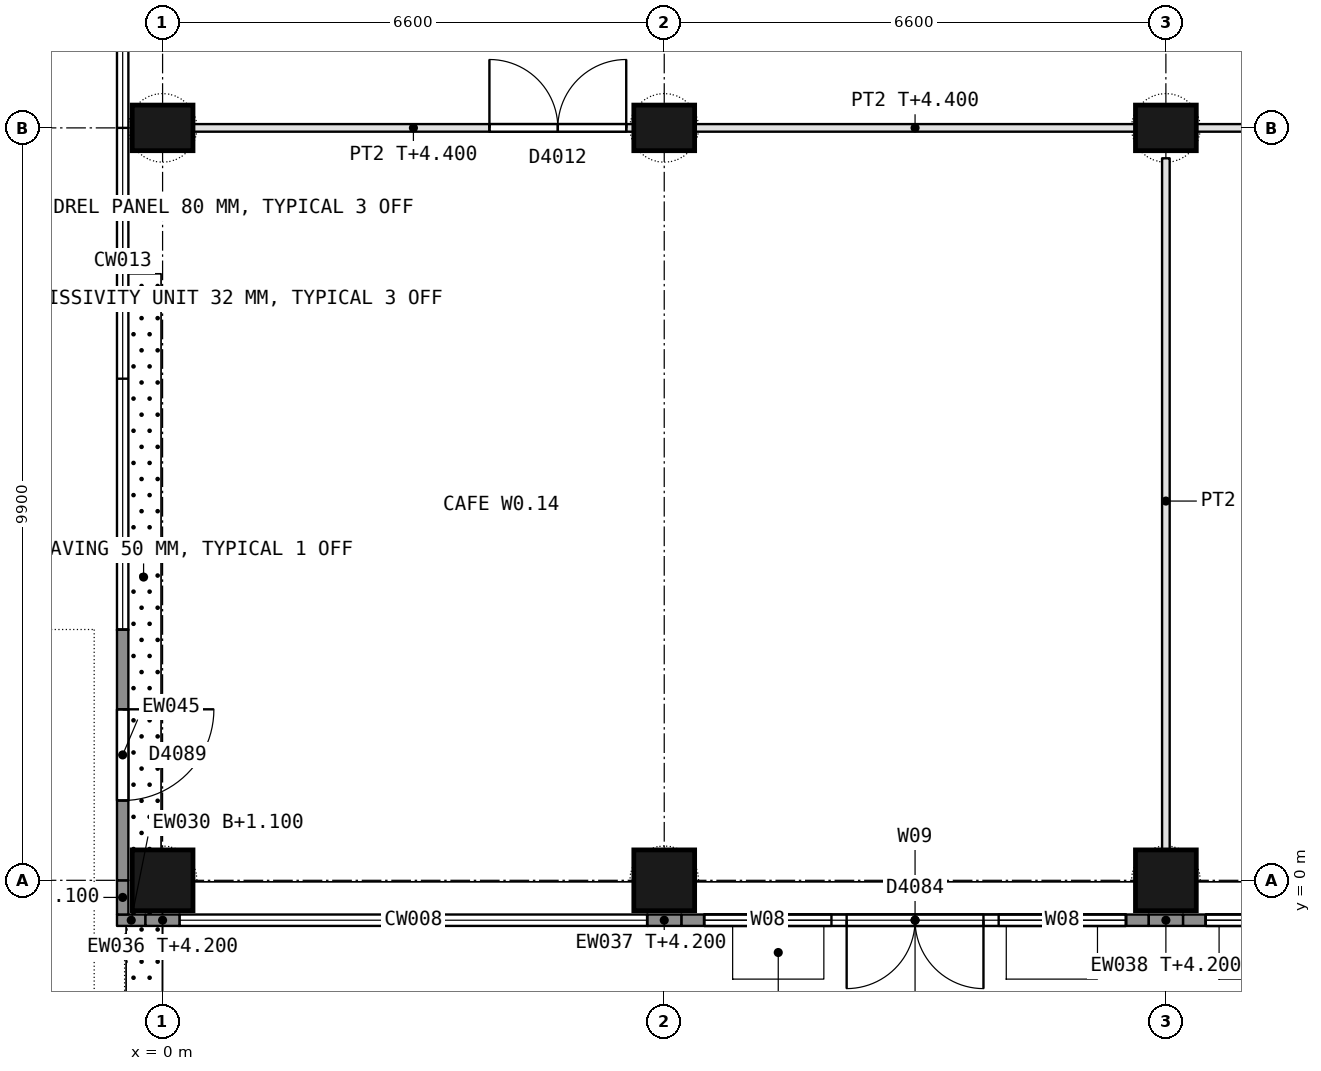
"""IFC4 building model, lengths in metres.
Left out: names, types, materials, properties, quantities, classifications, styles, units other than length and angle.
Written with IfcOpenShell. Run it as: python <this file> out.ifc"""

import sys

from ifc_helpers import new_model, si_unit, direction, frame, frame_2d, origin, origin_with_axes, origin_2d, place, context, subcontext, project, spatial, rectangle, extrude, element, fill, save


model = new_model("IFC4")
c1 = context("Model", 3, precision=1e-05, world=origin(), true_north=direction((0.0, 1.0)))
c2 = subcontext(c1, "Body", "Model", "MODEL_VIEW")
j1 = project(units=[si_unit("LENGTHUNIT", "METRE"), si_unit("PLANEANGLEUNIT", "RADIAN")], contexts=[c1])
p1 = place(None, origin())
s1 = spatial("IfcSite", under=j1, at=p1, CompositionType="ELEMENT")
p2 = place(p1, origin())
s2 = spatial("IfcBuilding", under=s1, at=p2, CompositionType="ELEMENT")
p3 = place(p2, origin())
s3 = spatial("IfcBuildingStorey", under=s2, at=p3, CompositionType="ELEMENT", Elevation=0.0)
p4 = place(p3, origin_with_axes())
e1 = element("IfcColumn", 1, at=p4, inside=s3, PredefinedType="COLUMN", context=c2, shape_type="SweptSolid", body=[
    extrude(rectangle(XDim=0.8, YDim=0.8, at=origin_2d()), origin(), (0.0, 0.0, 1.0), 5.4),
])
p5 = place(p3, frame((0.0, 9.9, 0.0), z_axis=(0.0, 0.0, 1.0), x_axis=(1.0, 0.0, 0.0)))
e2 = element("IfcColumn", 2, at=p5, inside=s3, PredefinedType="COLUMN", context=c2, shape_type="SweptSolid", body=[
    extrude(rectangle(XDim=0.8, YDim=0.6, at=origin_2d()), origin(), (0.0, 0.0, 1.0), 5.4),
])
p6 = place(p3, frame((6.6, 0.0, 0.0), z_axis=(0.0, 0.0, 1.0), x_axis=(1.0, 0.0, 0.0)))
e3 = element("IfcColumn", 3, at=p6, inside=s3, PredefinedType="COLUMN", context=c2, shape_type="SweptSolid", body=[
    extrude(rectangle(XDim=0.8, YDim=0.8, at=origin_2d()), origin(), (0.0, 0.0, 1.0), 5.4),
])
p7 = place(p3, frame((6.6, 9.9, 0.0), z_axis=(0.0, 0.0, 1.0), x_axis=(1.0, 0.0, 0.0)))
e4 = element("IfcColumn", 4, at=p7, inside=s3, PredefinedType="COLUMN", context=c2, shape_type="SweptSolid", body=[
    extrude(rectangle(XDim=0.8, YDim=0.6, at=origin_2d()), origin(), (0.0, 0.0, 1.0), 5.4),
])
p8 = place(p3, frame((13.2, 0.0, 0.0), z_axis=(0.0, 0.0, 1.0), x_axis=(1.0, 0.0, 0.0)))
e5 = element("IfcColumn", 5, at=p8, inside=s3, PredefinedType="COLUMN", context=c2, shape_type="SweptSolid", body=[
    extrude(rectangle(XDim=0.8, YDim=0.8, at=origin_2d()), origin(), (0.0, 0.0, 1.0), 5.4),
])
p9 = place(p3, frame((13.2, 9.9, 0.0), z_axis=(0.0, 0.0, 1.0), x_axis=(1.0, 0.0, 0.0)))
e6 = element("IfcColumn", 6, at=p9, inside=s3, PredefinedType="COLUMN", context=c2, shape_type="SweptSolid", body=[
    extrude(rectangle(XDim=0.8, YDim=0.6, at=origin_2d()), origin(), (0.0, 0.0, 1.0), 5.4),
])
p10 = place(p3, frame((-0.225, -0.525, 1.1), z_axis=(0.0, 0.0, 1.0), x_axis=(-1.0, 0.0, 0.0)))
e7 = element("IfcWall", 7, at=p10, inside=s3, PredefinedType="STANDARD", context=c2, shape_type="SweptSolid", body=[
    extrude(rectangle(XDim=0.375, YDim=0.15, at=frame_2d((0.188, 0.0))), origin(), (0.0, 0.0, 1.0), 4.0),
])
p11 = place(p3, frame((12.975, -0.525, 0.0), z_axis=(0.0, 0.0, 1.0), x_axis=(-1.0, 0.0, 0.0)))
e8 = element("IfcWall", 8, at=p11, inside=s3, PredefinedType="STANDARD", context=c2, shape_type="SweptSolid", body=[
    extrude(rectangle(XDim=6.15, YDim=0.15, at=frame_2d((3.075, 0.0))), origin(), (0.0, 0.0, 1.0), 5.1),
])
p12 = place(p11, frame((2.175, 0.0, 0.0)))
e9 = element("IfcOpeningElement", 9, at=p12, cuts=e8, PredefinedType="OPENING", context=c2, shape_type="SweptSolid", body=[
    extrude(rectangle(XDim=1.8, YDim=2.4, at=frame_2d((0.9, 1.2))), frame((0.0, 0.085, 0.0), z_axis=(0.0, -1.0, 0.0), x_axis=(1.0, 0.0, 0.0)), (0.0, 0.0, 1.0), 0.17),
])
p13 = place(p11, frame((4.175, 0.0, 0.1)))
e10 = element("IfcOpeningElement", 10, at=p13, cuts=e8, PredefinedType="OPENING", context=c2, shape_type="SweptSolid", body=[
    extrude(rectangle(XDim=1.675, YDim=2.3, at=frame_2d((0.837, 1.15))), frame((0.0, 0.085, 0.0), z_axis=(0.0, -1.0, 0.0), x_axis=(1.0, 0.0, 0.0)), (0.0, 0.0, 1.0), 0.17),
])
p14 = place(p11, frame((0.3, 0.0, 0.1)))
e11 = element("IfcOpeningElement", 11, at=p14, cuts=e8, PredefinedType="OPENING", context=c2, shape_type="SweptSolid", body=[
    extrude(rectangle(XDim=1.675, YDim=2.3, at=frame_2d((0.837, 1.15))), frame((0.0, 0.085, 0.0), z_axis=(0.0, -1.0, 0.0), x_axis=(1.0, 0.0, 0.0)), (0.0, 0.0, 1.0), 0.17),
])
p15 = place(p11, frame((0.3, 0.0, 2.55)))
e12 = element("IfcOpeningElement", 12, at=p15, cuts=e8, PredefinedType="OPENING", context=c2, shape_type="SweptSolid", body=[
    extrude(rectangle(XDim=5.55, YDim=2.4, at=frame_2d((2.775, 1.2))), frame((0.0, 0.085, 0.0), z_axis=(0.0, -1.0, 0.0), x_axis=(1.0, 0.0, 0.0)), (0.0, 0.0, 1.0), 0.17),
])
p16 = place(p3, frame((19.575, -0.525, 0.0), z_axis=(0.0, 0.0, 1.0), x_axis=(-1.0, 0.0, 0.0)))
e13 = element("IfcWall", 13, at=p16, inside=s3, PredefinedType="STANDARD", context=c2, shape_type="SweptSolid", body=[
    extrude(rectangle(XDim=6.15, YDim=0.15, at=frame_2d((3.075, 0.0))), origin(), (0.0, 0.0, 1.0), 5.1),
])
p17 = place(p16, frame((1.975, 0.0, 0.0)))
e14 = element("IfcOpeningElement", 14, at=p17, cuts=e13, PredefinedType="OPENING", context=c2, shape_type="SweptSolid", body=[
    extrude(rectangle(XDim=2.2, YDim=2.4, at=frame_2d((1.1, 1.2))), frame((0.0, 0.085, 0.0), z_axis=(0.0, -1.0, 0.0), x_axis=(1.0, 0.0, 0.0)), (0.0, 0.0, 1.0), 0.17),
])
p18 = place(p16, frame((4.375, 0.0, 0.1)))
e15 = element("IfcOpeningElement", 15, at=p18, cuts=e13, PredefinedType="OPENING", context=c2, shape_type="SweptSolid", body=[
    extrude(rectangle(XDim=1.475, YDim=2.3, at=frame_2d((0.738, 1.15))), frame((0.0, 0.085, 0.0), z_axis=(0.0, -1.0, 0.0), x_axis=(1.0, 0.0, 0.0)), (0.0, 0.0, 1.0), 0.17),
])
p19 = place(p16, frame((0.3, 0.0, 0.1)))
e16 = element("IfcOpeningElement", 16, at=p19, cuts=e13, PredefinedType="OPENING", context=c2, shape_type="SweptSolid", body=[
    extrude(rectangle(XDim=1.475, YDim=2.3, at=frame_2d((0.738, 1.15))), frame((0.0, 0.085, 0.0), z_axis=(0.0, -1.0, 0.0), x_axis=(1.0, 0.0, 0.0)), (0.0, 0.0, 1.0), 0.17),
])
p20 = place(p16, frame((0.3, 0.0, 2.55)))
e17 = element("IfcOpeningElement", 17, at=p20, cuts=e13, PredefinedType="OPENING", context=c2, shape_type="SweptSolid", body=[
    extrude(rectangle(XDim=5.55, YDim=2.4, at=frame_2d((2.775, 1.2))), frame((0.0, 0.085, 0.0), z_axis=(0.0, -1.0, 0.0), x_axis=(1.0, 0.0, 0.0)), (0.0, 0.0, 1.0), 0.17),
])
p21 = place(p3, frame((0.225, -0.525, 0.0), z_axis=(0.0, 0.0, 1.0), x_axis=(-1.0, 0.0, 0.0)))
e18 = element("IfcWall", 18, at=p21, inside=s3, PredefinedType="STANDARD", context=c2, shape_type="SweptSolid", body=[
    extrude(rectangle(XDim=0.45, YDim=0.15, at=frame_2d((0.225, 0.0))), origin(), (0.0, 0.0, 1.0), 4.2),
])
for number, where, z_axis, x_axis in (
    (19, (6.825, -0.525, 0.0), (0.0, 0.0, 1.0), (-1.0, 0.0, 0.0)),
    (20, (13.425, -0.525, 0.0), (0.0, 0.0, 1.0), (-1.0, 0.0, 0.0)),
):
    element("IfcWall", number, at=place(p3, frame(where, z_axis=z_axis, x_axis=x_axis)), inside=s3, PredefinedType="STANDARD", context=c2, shape_type="SweptSolid", body=[
        extrude(rectangle(XDim=0.45, YDim=0.15, at=frame_2d((0.225, 0.0))), origin(), (0.0, 0.0, 1.0), 4.2),
    ])
p22 = place(p3, frame((-0.525, -0.45, 1.1), z_axis=(0.0, 0.0, 1.0), x_axis=(0.0, 1.0, 0.0)))
e21 = element("IfcWall", 21, at=p22, inside=s3, PredefinedType="STANDARD", context=c2, shape_type="SweptSolid", body=[
    extrude(rectangle(XDim=0.45, YDim=0.15, at=frame_2d((0.225, 0.0))), origin(), (0.0, 0.0, 1.0), 4.0),
])
p23 = place(p3, frame((-0.525, 0.0, 0.0), z_axis=(0.0, 0.0, 1.0), x_axis=(0.0, 1.0, 0.0)))
e22 = element("IfcWall", 22, at=p23, inside=s3, PredefinedType="STANDARD", context=c2, shape_type="SweptSolid", body=[
    extrude(rectangle(XDim=3.3, YDim=0.15, at=frame_2d((1.65, 0.0))), origin(), (0.0, 0.0, 1.0), 5.1),
])
p24 = place(p23, frame((1.05, 0.0, 0.0)))
e23 = element("IfcOpeningElement", 23, at=p24, cuts=e22, PredefinedType="OPENING", context=c2, shape_type="SweptSolid", body=[
    extrude(rectangle(XDim=1.2, YDim=2.4, at=frame_2d((0.6, 1.2))), frame((0.0, 0.085, 0.0), z_axis=(0.0, -1.0, 0.0), x_axis=(1.0, 0.0, 0.0)), (0.0, 0.0, 1.0), 0.17),
])
p25 = place(p3, frame((0.4, 9.9, 0.0), z_axis=(0.0, 0.0, 1.0), x_axis=(1.0, 0.0, 0.0)))
e24 = element("IfcWall", 24, at=p25, inside=s3, PredefinedType="PARTITIONING", context=c2, shape_type="SweptSolid", body=[
    extrude(rectangle(XDim=5.8, YDim=0.1, at=frame_2d((2.9, 0.0))), origin(), (0.0, 0.0, 1.0), 4.4),
])
p26 = place(p25, frame((3.9, 0.0, 0.0)))
e25 = element("IfcOpeningElement", 25, at=p26, cuts=e24, PredefinedType="OPENING", context=c2, shape_type="SweptSolid", body=[
    extrude(rectangle(XDim=1.8, YDim=2.4, at=frame_2d((0.9, 1.2))), frame((0.0, 0.06, 0.0), z_axis=(0.0, -1.0, 0.0), x_axis=(1.0, 0.0, 0.0)), (0.0, 0.0, 1.0), 0.12),
])
p27 = place(p3, frame((7.0, 9.9, 0.0), z_axis=(0.0, 0.0, 1.0), x_axis=(1.0, 0.0, 0.0)))
e26 = element("IfcWall", 26, at=p27, inside=s3, PredefinedType="PARTITIONING", context=c2, shape_type="SweptSolid", body=[
    extrude(rectangle(XDim=5.8, YDim=0.1, at=frame_2d((2.9, 0.0))), origin(), (0.0, 0.0, 1.0), 4.4),
])
p28 = place(p3, frame((13.6, 9.9, 0.0), z_axis=(0.0, 0.0, 1.0), x_axis=(1.0, 0.0, 0.0)))
e27 = element("IfcWall", 27, at=p28, inside=s3, PredefinedType="PARTITIONING", context=c2, shape_type="SweptSolid", body=[
    extrude(rectangle(XDim=5.8, YDim=0.1, at=frame_2d((2.9, 0.0))), origin(), (0.0, 0.0, 1.0), 4.4),
])
p29 = place(p3, frame((13.2, 0.4, 0.0), z_axis=(0.0, 0.0, 1.0), x_axis=(0.0, 1.0, 0.0)))
e28 = element("IfcWall", 28, at=p29, inside=s3, PredefinedType="PARTITIONING", context=c2, shape_type="SweptSolid", body=[
    extrude(rectangle(XDim=9.1, YDim=0.1, at=frame_2d((4.55, 0.0))), origin(), (0.0, 0.0, 1.0), 4.2),
])
p30 = place(p12, origin())
e29 = element("IfcDoor", 29, at=p30, inside=s3, OperationType="DOUBLE_DOOR_SINGLE_SWING", PredefinedType="DOOR", context=c2, shape_type="SweptSolid", body=[
    extrude(rectangle(XDim=1.8, YDim=2.4, at=frame_2d((0.9, 1.2))), frame((0.0, 0.025, 0.0), z_axis=(0.0, -1.0, 0.0), x_axis=(1.0, 0.0, 0.0)), (0.0, 0.0, 1.0), 0.05),
])
fill(e9, e29)
p31 = place(p13, origin())
e30 = element("IfcWindow", 30, at=p31, inside=s3, PartitioningType="SINGLE_PANEL", PredefinedType="WINDOW", context=c2, shape_type="SweptSolid", body=[
    extrude(rectangle(XDim=1.675, YDim=2.3, at=frame_2d((0.837, 1.15))), frame((0.0, 0.03, 0.0), z_axis=(0.0, -1.0, 0.0), x_axis=(1.0, 0.0, 0.0)), (0.0, 0.0, 1.0), 0.06),
])
fill(e10, e30)
p32 = place(p14, origin())
e31 = element("IfcWindow", 31, at=p32, inside=s3, PartitioningType="SINGLE_PANEL", PredefinedType="WINDOW", context=c2, shape_type="SweptSolid", body=[
    extrude(rectangle(XDim=1.675, YDim=2.3, at=frame_2d((0.837, 1.15))), frame((0.0, 0.03, 0.0), z_axis=(0.0, -1.0, 0.0), x_axis=(1.0, 0.0, 0.0)), (0.0, 0.0, 1.0), 0.06),
])
fill(e11, e31)
p33 = place(p15, origin())
e32 = element("IfcWindow", 32, at=p33, inside=s3, PartitioningType="SINGLE_PANEL", PredefinedType="WINDOW", context=c2, shape_type="SweptSolid", body=[
    extrude(rectangle(XDim=5.55, YDim=2.4, at=frame_2d((2.775, 1.2))), frame((0.0, 0.03, 0.0), z_axis=(0.0, -1.0, 0.0), x_axis=(1.0, 0.0, 0.0)), (0.0, 0.0, 1.0), 0.06),
])
fill(e12, e32)
p34 = place(p18, origin())
e33 = element("IfcWindow", 33, at=p34, inside=s3, PartitioningType="SINGLE_PANEL", PredefinedType="WINDOW", context=c2, shape_type="SweptSolid", body=[
    extrude(rectangle(XDim=1.475, YDim=2.3, at=frame_2d((0.738, 1.15))), frame((0.0, 0.03, 0.0), z_axis=(0.0, -1.0, 0.0), x_axis=(1.0, 0.0, 0.0)), (0.0, 0.0, 1.0), 0.06),
])
fill(e15, e33)
p35 = place(p20, origin())
e34 = element("IfcWindow", 34, at=p35, inside=s3, PartitioningType="SINGLE_PANEL", PredefinedType="WINDOW", context=c2, shape_type="SweptSolid", body=[
    extrude(rectangle(XDim=5.55, YDim=2.4, at=frame_2d((2.775, 1.2))), frame((0.0, 0.03, 0.0), z_axis=(0.0, -1.0, 0.0), x_axis=(1.0, 0.0, 0.0)), (0.0, 0.0, 1.0), 0.06),
])
fill(e17, e34)
p36 = place(p24, origin())
e35 = element("IfcDoor", 35, at=p36, inside=s3, OperationType="SINGLE_SWING_RIGHT", PredefinedType="DOOR", context=c2, shape_type="SweptSolid", body=[
    extrude(rectangle(XDim=1.2, YDim=2.4, at=frame_2d((0.6, 1.2))), frame((0.0, 0.025, 0.0), z_axis=(0.0, -1.0, 0.0), x_axis=(1.0, 0.0, 0.0)), (0.0, 0.0, 1.0), 0.05),
])
fill(e23, e35)
p37 = place(p26, origin())
e36 = element("IfcDoor", 36, at=p37, inside=s3, OperationType="DOUBLE_DOOR_SINGLE_SWING", PredefinedType="DOOR", context=c2, shape_type="SweptSolid", body=[
    extrude(rectangle(XDim=1.8, YDim=2.4, at=frame_2d((0.9, 1.2))), frame((0.0, 0.025, 0.0), z_axis=(0.0, -1.0, 0.0), x_axis=(1.0, 0.0, 0.0)), (0.0, 0.0, 1.0), 0.05),
])
fill(e25, e36)
save(model, sys.argv[1])
